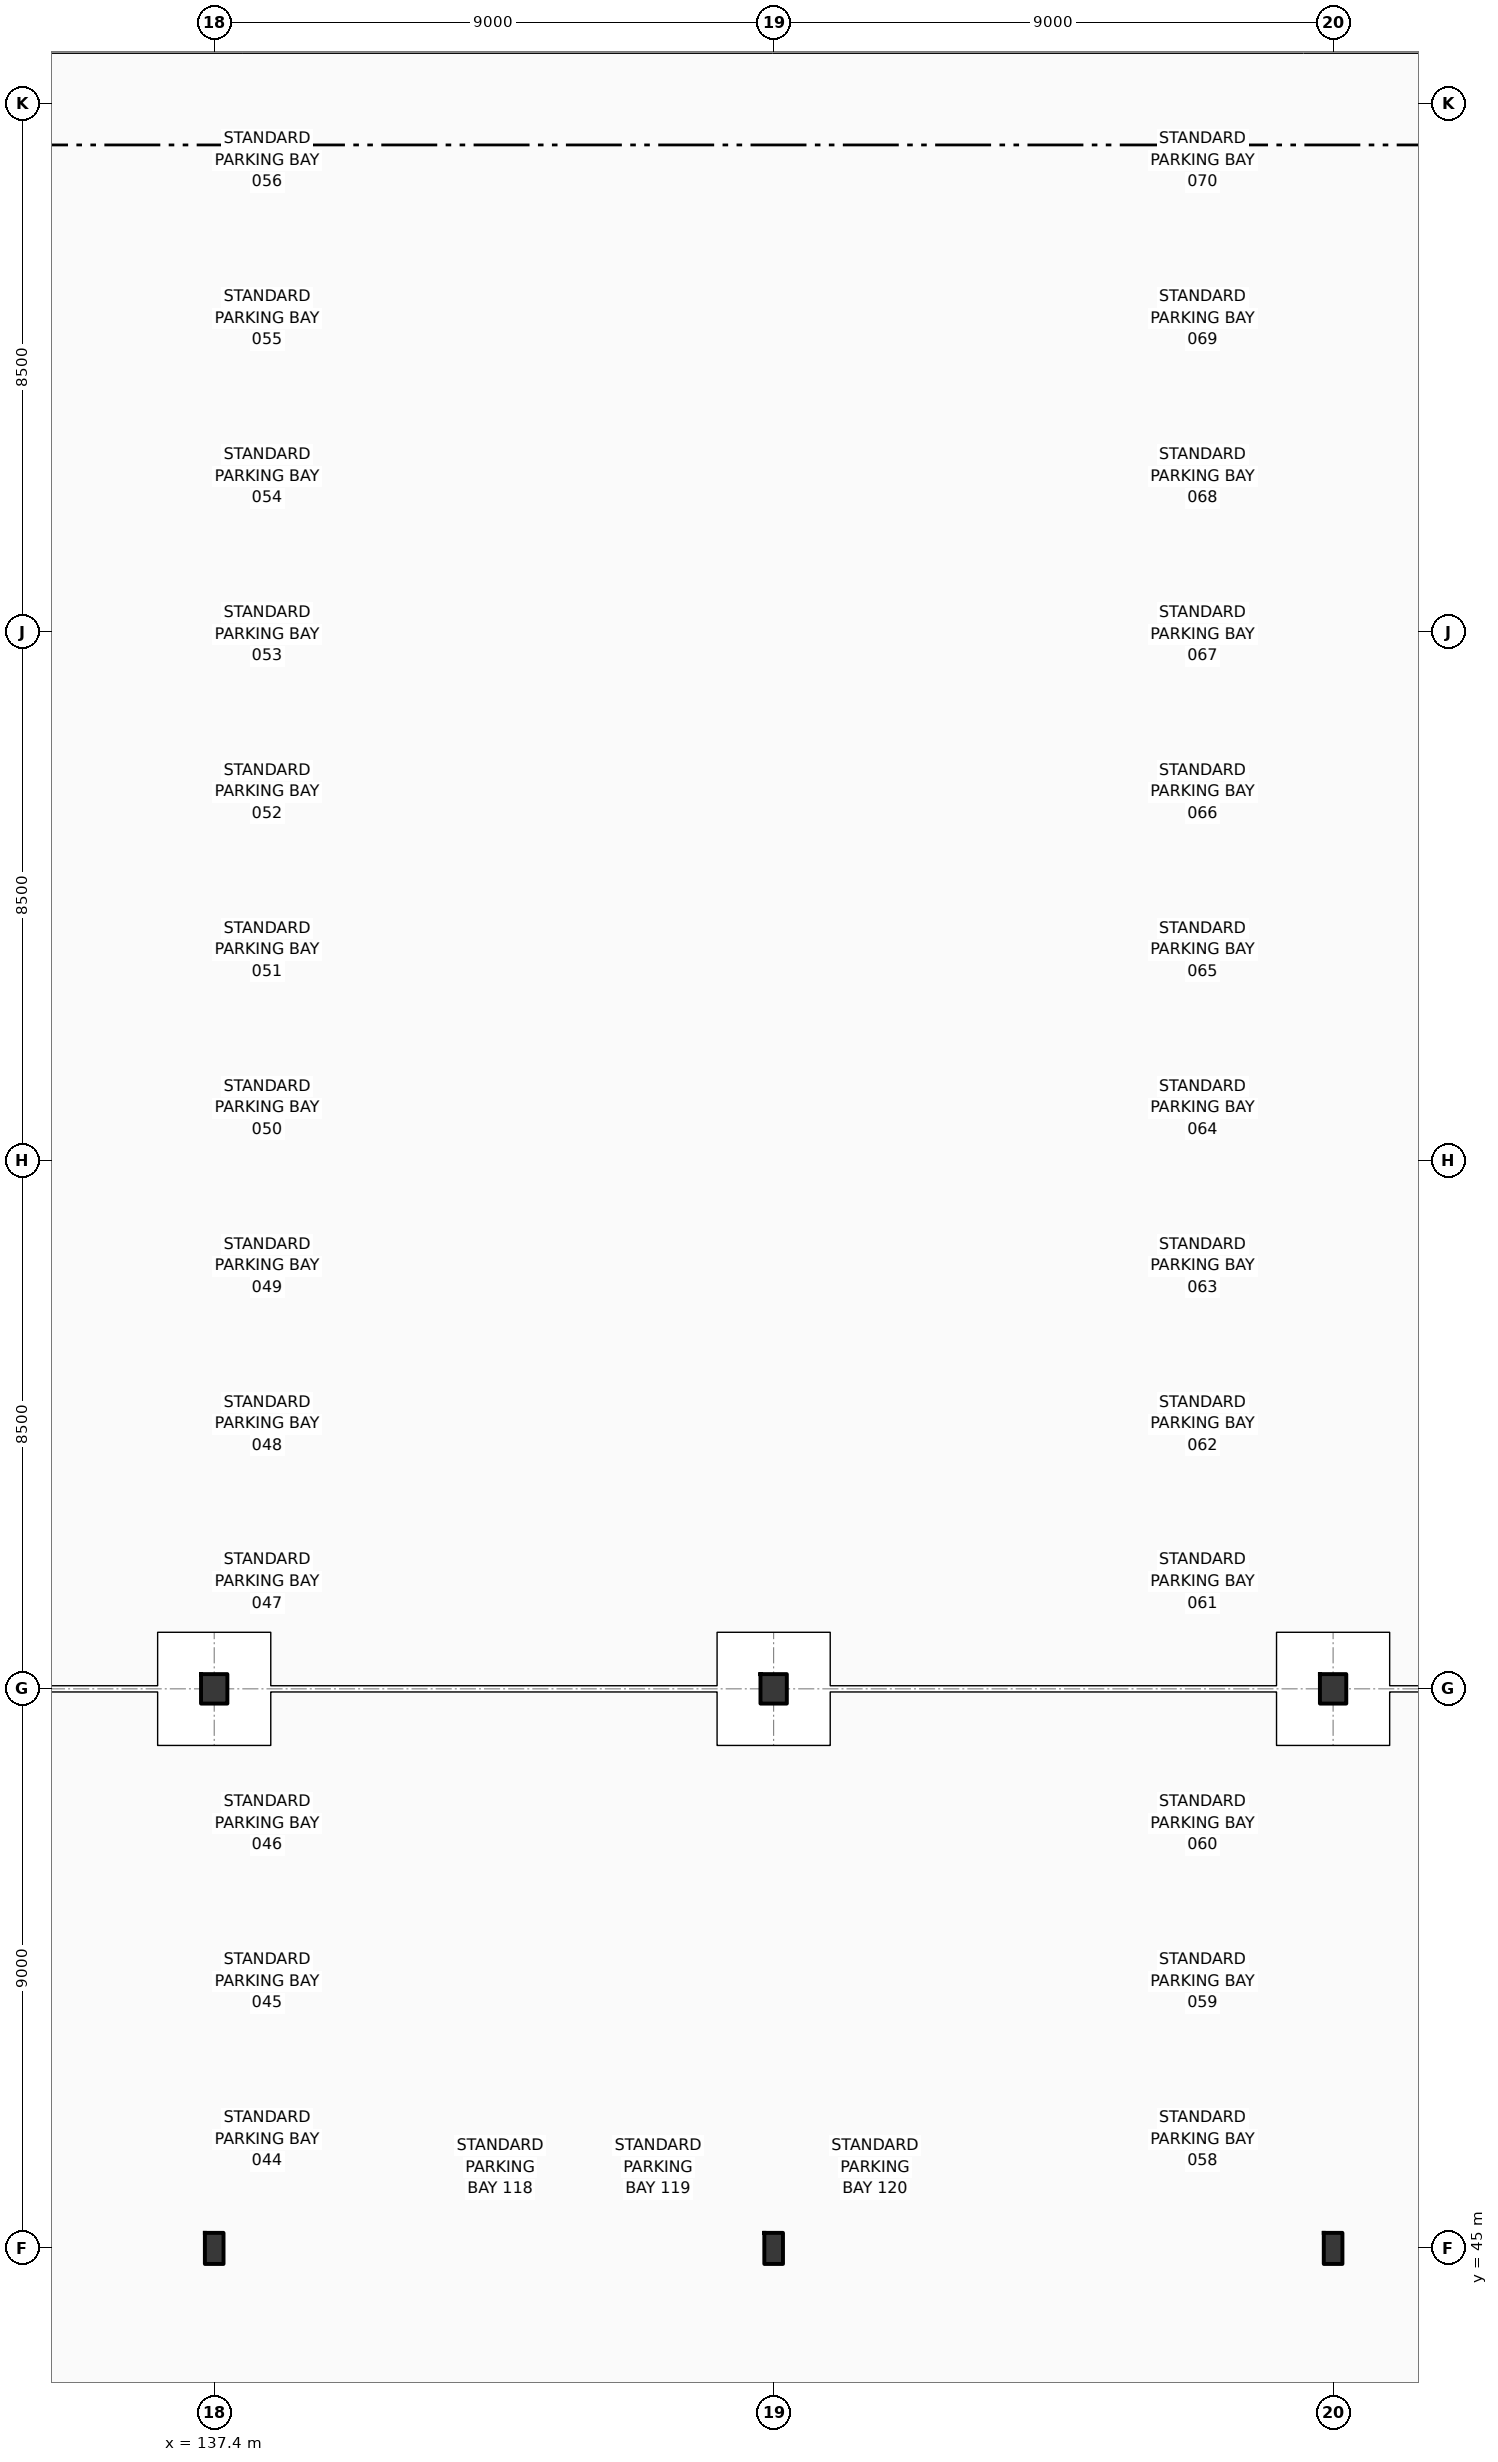
"""IFC4 building model, lengths in metres.
Left out: names, types, materials, properties, quantities, classifications, styles, units other than length and angle.
Written with IfcOpenShell. Run it as: python <this file> out.ifc"""

import sys

from ifc_helpers import new_model, si_unit, direction, frame, origin, origin_2d, place, context, subcontext, project, spatial, i_section, extrude, element, save


model = new_model("IFC4")
c1 = context("Model", 3, precision=1e-05, world=origin(), true_north=direction((0.0, 1.0)))
c2 = subcontext(c1, "Body", "Model", "MODEL_VIEW")
j1 = project(units=[si_unit("LENGTHUNIT", "METRE"), si_unit("PLANEANGLEUNIT", "RADIAN")], contexts=[c1])
p1 = place(None, origin())
s1 = spatial("IfcSite", under=j1, at=p1, CompositionType="ELEMENT")
p2 = place(p1, origin())
s2 = spatial("IfcBuilding", under=s1, at=p2, CompositionType="ELEMENT")
p3 = place(p2, frame((0.0, 0.0, -4.5)))
s3 = spatial("IfcBuildingStorey", under=s2, at=p3, CompositionType="ELEMENT", Elevation=-4.5)
for number, where, z_axis, x_axis in (
    (1, (137.4, 54.0, 0.0), (0.0, 0.0, 1.0), (1.0, 0.0, 0.0)),
    (2, (146.4, 54.0, 0.0), (0.0, 0.0, 1.0), (1.0, 0.0, 0.0)),
    (3, (155.4, 54.0, 0.0), (0.0, 0.0, 1.0), (1.0, 0.0, 0.0)),
):
    element("IfcColumn", number, at=place(p3, frame(where, z_axis=z_axis, x_axis=x_axis)), inside=s3, PredefinedType="COLUMN", context=c2, shape_type="SweptSolid", body=[
        extrude(i_section(OverallWidth=0.424, OverallDepth=0.474, WebThickness=0.045, FlangeThickness=0.055, FilletRadius=0.015, at=origin_2d()), origin(), (0.0, 0.0, 1.0), 4.5),
    ])
for number, where, z_axis, x_axis in (
    (4, (137.4, 45.0, 0.0), (0.0, 0.0, 1.0), (1.0, 0.0, 0.0)),
    (5, (146.4, 45.0, 0.0), (0.0, 0.0, 1.0), (1.0, 0.0, 0.0)),
    (6, (155.4, 45.0, 0.0), (0.0, 0.0, 1.0), (1.0, 0.0, 0.0)),
):
    element("IfcColumn", number, at=place(p3, frame(where, z_axis=z_axis, x_axis=x_axis)), inside=s3, PredefinedType="COLUMN", context=c2, shape_type="SweptSolid", body=[
        extrude(i_section(OverallWidth=0.3, OverallDepth=0.5, WebThickness=0.014, FlangeThickness=0.028, FilletRadius=0.027, at=origin_2d()), origin(), (0.0, 0.0, 1.0), 4.5),
    ])
save(model, sys.argv[1])
